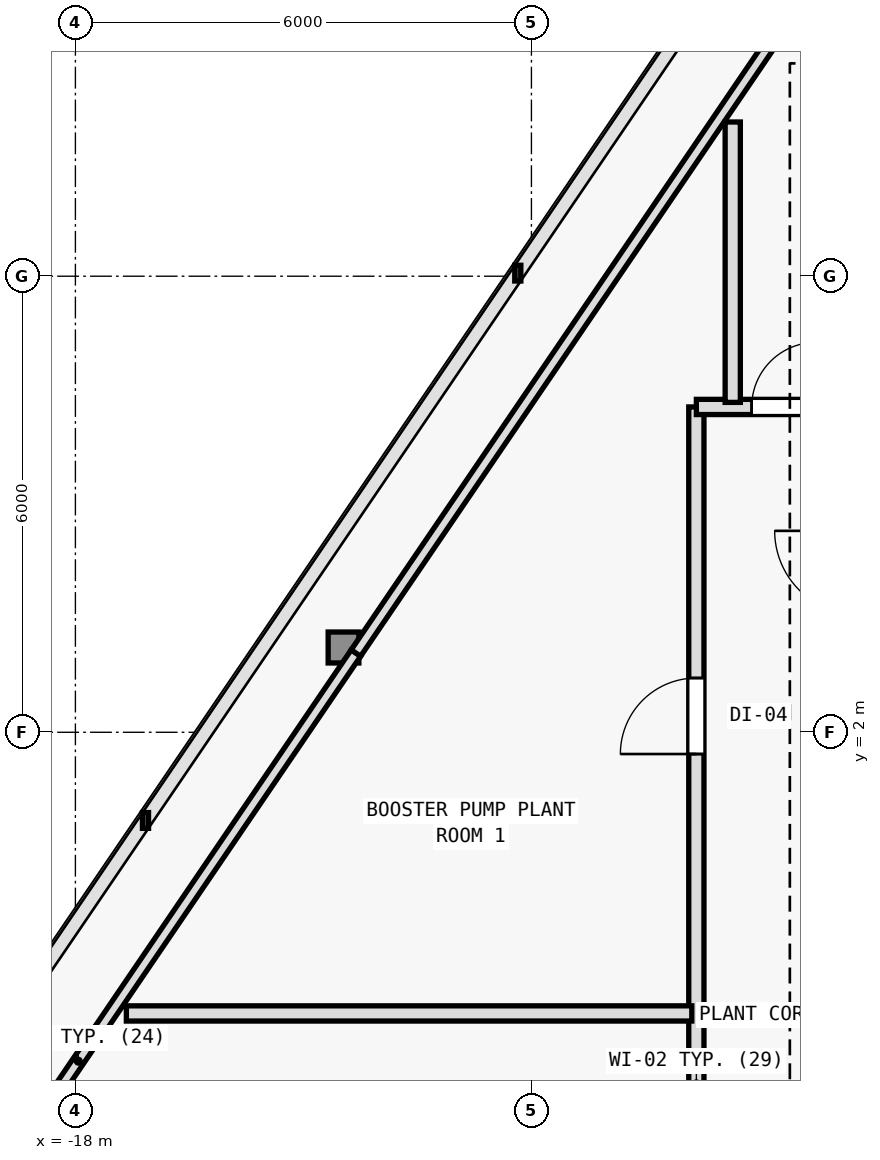
"""IFC4 building model, lengths in metres.
Left out: names, types, materials, properties, quantities, classifications, styles, units other than length and angle.
Written with IfcOpenShell. Run it as: python <this file> out.ifc"""

import sys

from ifc_helpers import new_model, si_unit, direction, frame, frame_2d, origin, origin_2d, place, context, subcontext, project, spatial, rectangle, i_section, extrude, element, fill, save


model = new_model("IFC4")
c1 = context("Model", 3, precision=1e-05, world=origin(), true_north=direction((0.0, 1.0)))
c2 = subcontext(c1, "Body", "Model", "MODEL_VIEW")
j1 = project(units=[si_unit("LENGTHUNIT", "METRE"), si_unit("PLANEANGLEUNIT", "RADIAN")], contexts=[c1])
p1 = place(None, origin())
s1 = spatial("IfcSite", under=j1, at=p1, CompositionType="ELEMENT")
p2 = place(p1, origin())
s2 = spatial("IfcBuilding", under=s1, at=p2, CompositionType="ELEMENT")
p3 = place(p2, frame((0.0, 0.0, 129.3)))
s3 = spatial("IfcBuildingStorey", under=s2, at=p3, CompositionType="ELEMENT", Elevation=129.3)
p4 = place(p3, frame((-14.472, 3.115, 0.005), z_axis=(0.012743334138, 0.007187240454, 0.999892969777), x_axis=(-0.491253415567, 0.871016694268, 0.0)))
e1 = element("IfcColumn", 1, at=p4, inside=s3, PredefinedType="COLUMN", context=c2, shape_type="SweptSolid", body=[
    extrude(i_section(OverallWidth=0.404, OverallDepth=0.407, WebThickness=0.017, FlangeThickness=0.028, FilletRadius=0.015, at=origin_2d()), origin(), (0.0, 0.0, 1.0), 4.79),
])
p5 = place(p3, frame((-21.615, -7.697, 0.0), z_axis=(0.0, 0.0, 1.0), x_axis=(0.562462197544, 0.826823001817, 0.0)))
e2 = element("IfcWall", 2, at=p5, inside=s3, PredefinedType="PARTITIONING", context=c2, shape_type="SweptSolid", body=[
    extrude(rectangle(XDim=12.988, YDim=0.15, at=frame_2d((6.494, 0.0))), origin(), (0.0, 0.0, 1.0), 3.925),
])
p6 = place(p3, frame((-14.31, 3.042, 0.0), z_axis=(0.0, 0.0, 1.0), x_axis=(0.562466830755, 0.826819849968, 0.0)))
e3 = element("IfcWall", 3, at=p6, inside=s3, PredefinedType="PARTITIONING", context=c2, shape_type="SweptSolid", body=[
    extrude(rectangle(XDim=12.988, YDim=0.15, at=frame_2d((6.494, 0.0))), origin(), (0.0, 0.0, 1.0), 4.035),
])
p7 = place(p3, frame((-9.83, -11.53, 0.0), z_axis=(0.0, 0.0, 1.0), x_axis=(0.0, 1.0, 0.0)))
e4 = element("IfcWall", 4, at=p7, inside=s3, PredefinedType="SOLIDWALL", context=c2, shape_type="SweptSolid", body=[
    extrude(rectangle(XDim=17.81, YDim=0.2, at=frame_2d((8.905, 0.0))), origin(), (0.0, 0.0, 1.0), 3.875),
])
p8 = place(p7, frame((4.492, 0.0, 0.0)))
e5 = element("IfcOpeningElement", 5, at=p8, cuts=e4, PredefinedType="OPENING", context=c2, shape_type="SweptSolid", body=[
    extrude(rectangle(XDim=1.0, YDim=2.15, at=frame_2d((0.5, 1.075))), frame((0.0, 0.11, 0.0), z_axis=(0.0, -1.0, 0.0), x_axis=(1.0, 0.0, 0.0)), (0.0, 0.0, 1.0), 0.22),
])
p9 = place(p7, frame((13.244, 0.0, 0.0)))
e6 = element("IfcOpeningElement", 6, at=p9, cuts=e4, PredefinedType="OPENING", context=c2, shape_type="SweptSolid", body=[
    extrude(rectangle(XDim=1.0, YDim=2.15, at=frame_2d((0.5, 1.075))), frame((0.0, 0.11, 0.0), z_axis=(0.0, -1.0, 0.0), x_axis=(1.0, 0.0, 0.0)), (0.0, 0.0, 1.0), 0.22),
])
p10 = place(p3, frame((-9.83, 6.28, 0.0), z_axis=(0.0, 0.0, 1.0), x_axis=(1.0, 0.0, 0.0)))
e7 = element("IfcWall", 7, at=p10, inside=s3, PredefinedType="SOLIDWALL", context=c2, shape_type="SweptSolid", body=[
    extrude(rectangle(XDim=1.83, YDim=0.2, at=frame_2d((0.915, 0.0))), origin(), (0.0, 0.0, 1.0), 4.175),
])
p11 = place(p10, frame((0.728, 0.0, 0.0)))
e8 = element("IfcOpeningElement", 8, at=p11, cuts=e7, PredefinedType="OPENING", context=c2, shape_type="SweptSolid", body=[
    extrude(rectangle(XDim=0.85, YDim=2.1, at=frame_2d((0.425, 1.05))), frame((0.0, 0.11, 0.0), z_axis=(0.0, -1.0, 0.0), x_axis=(1.0, 0.0, 0.0)), (0.0, 0.0, 1.0), 0.22),
])
p12 = place(p3, frame((-9.89, -1.699, 0.0), z_axis=(0.0, 0.0, 1.0), x_axis=(-1.0, 0.0, 0.0)))
e9 = element("IfcWall", 9, at=p12, inside=s3, PredefinedType="SOLIDWALL", context=c2, shape_type="SweptSolid", body=[
    extrude(rectangle(XDim=7.44, YDim=0.2, at=frame_2d((3.72, 0.0))), origin(), (0.0, 0.0, 1.0), 3.875),
])
p13 = place(p3, frame((-9.351, 6.34, 0.0), z_axis=(0.0, 0.0, 1.0), x_axis=(0.0, 1.0, 0.0)))
e10 = element("IfcWall", 10, at=p13, inside=s3, PredefinedType="SOLIDWALL", context=c2, shape_type="SweptSolid", body=[
    extrude(rectangle(XDim=3.689, YDim=0.2, at=frame_2d((1.844, 0.0))), origin(), (0.0, 0.0, 1.0), 4.175),
])
p14 = place(p11, origin())
e11 = element("IfcDoor", 11, at=p14, inside=s3, OperationType="SINGLE_SWING_RIGHT", PredefinedType="DOOR", context=c2, shape_type="SweptSolid", body=[
    extrude(rectangle(XDim=0.85, YDim=2.1, at=frame_2d((0.425, 1.05))), frame((0.0, 0.025, 0.0), z_axis=(0.0, -1.0, 0.0), x_axis=(1.0, 0.0, 0.0)), (0.0, 0.0, 1.0), 0.05),
])
fill(e8, e11)
p15 = place(p9, origin())
e12 = element("IfcDoor", 12, at=p15, inside=s3, OperationType="SINGLE_SWING_LEFT", PredefinedType="DOOR", context=c2, shape_type="SweptSolid", body=[
    extrude(rectangle(XDim=1.0, YDim=2.15, at=frame_2d((0.5, 1.075))), frame((0.0, 0.025, 0.0), z_axis=(0.0, -1.0, 0.0), x_axis=(1.0, 0.0, 0.0)), (0.0, 0.0, 1.0), 0.05),
])
fill(e6, e12)
save(model, sys.argv[1])
